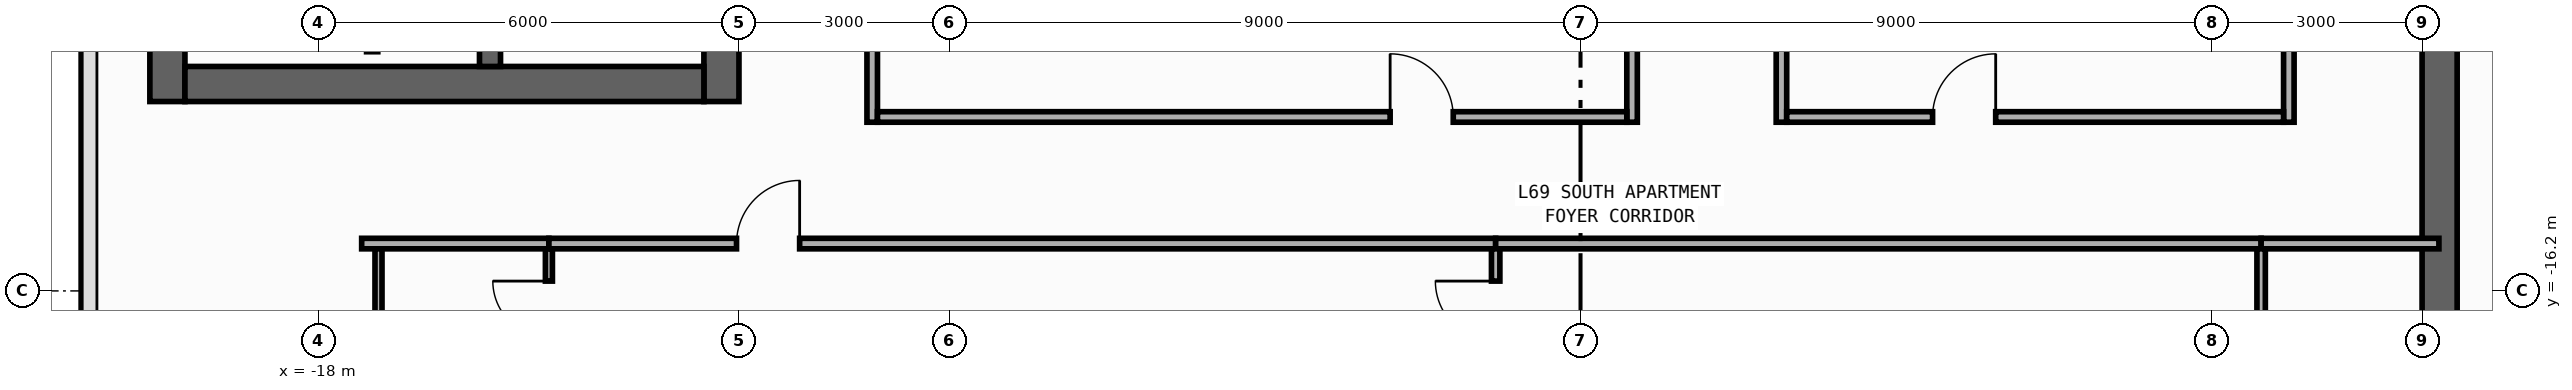
"""IFC4 building model, lengths in metres.
Left out: names, types, materials, properties, quantities, classifications, styles, units other than length and angle.
Written with IfcOpenShell. Run it as: python <this file> out.ifc"""

import sys

from ifc_helpers import new_model, si_unit, direction, frame, frame_2d, origin, place, context, subcontext, project, spatial, rectangle, extrude, element, fill, save


model = new_model("IFC4")
c1 = context("Model", 3, precision=1e-05, world=origin(), true_north=direction((0.0, 1.0)))
c2 = subcontext(c1, "Body", "Model", "MODEL_VIEW")
j1 = project(units=[si_unit("LENGTHUNIT", "METRE"), si_unit("PLANEANGLEUNIT", "RADIAN")], contexts=[c1])
p1 = place(None, origin())
s1 = spatial("IfcSite", under=j1, at=p1, CompositionType="ELEMENT")
p2 = place(p1, origin())
s2 = spatial("IfcBuilding", under=s1, at=p2, CompositionType="ELEMENT")
p3 = place(p2, frame((0.0, 0.0, 289.0)))
s3 = spatial("IfcBuildingStorey", under=s2, at=p3, CompositionType="ELEMENT", Elevation=289.0)
p4 = place(p3, frame((-20.15, -13.5, 0.0), z_axis=(0.0, 0.0, 1.0), x_axis=(0.0, 1.0, 0.0)))
e1 = element("IfcWall", 1, at=p4, inside=s3, PredefinedType="SHEAR", context=c2, shape_type="SweptSolid", body=[
    extrude(rectangle(XDim=27.0, YDim=0.5, at=frame_2d((13.5, 0.0))), origin(), (0.0, 0.0, 1.0), 3.54),
])
p5 = place(p3, frame((-12.25, -13.5, 0.0), z_axis=(0.0, 0.0, 1.0), x_axis=(0.0, 1.0, 0.0)))
e2 = element("IfcWall", 2, at=p5, inside=s3, PredefinedType="SHEAR", context=c2, shape_type="SweptSolid", body=[
    extrude(rectangle(XDim=27.0, YDim=0.5, at=frame_2d((13.5, 0.0))), origin(), (0.0, 0.0, 1.0), 3.54),
])
p6 = place(p5, frame((15.175, 0.0, 0.0)))
e3 = element("IfcOpeningElement", 3, at=p6, cuts=e2, PredefinedType="OPENING", context=c2, shape_type="SweptSolid", body=[
    extrude(rectangle(XDim=0.85, YDim=2.1, at=frame_2d((0.425, 1.05))), frame((0.0, 0.26, 0.0), z_axis=(0.0, -1.0, 0.0), x_axis=(1.0, 0.0, 0.0)), (0.0, 0.0, 1.0), 0.52),
])
p7 = place(p5, frame((21.275, 0.0, 0.0)))
e4 = element("IfcOpeningElement", 4, at=p7, cuts=e2, PredefinedType="OPENING", context=c2, shape_type="SweptSolid", body=[
    extrude(rectangle(XDim=0.85, YDim=2.1, at=frame_2d((0.425, 1.05))), frame((0.0, 0.26, 0.0), z_axis=(0.0, -1.0, 0.0), x_axis=(1.0, 0.0, 0.0)), (0.0, 0.0, 1.0), 0.52),
])
p8 = place(p5, frame((4.275, 0.0, 0.0)))
e5 = element("IfcOpeningElement", 5, at=p8, cuts=e2, PredefinedType="OPENING", context=c2, shape_type="SweptSolid", body=[
    extrude(rectangle(XDim=0.85, YDim=2.1, at=frame_2d((0.425, 1.05))), frame((0.0, 0.26, 0.0), z_axis=(0.0, -1.0, 0.0), x_axis=(1.0, 0.0, 0.0)), (0.0, 0.0, 1.0), 0.52),
])
p9 = place(p5, frame((10.275, 0.0, 0.0)))
e6 = element("IfcOpeningElement", 6, at=p9, cuts=e2, PredefinedType="OPENING", context=c2, shape_type="SweptSolid", body=[
    extrude(rectangle(XDim=0.85, YDim=2.1, at=frame_2d((0.425, 1.05))), frame((0.0, 0.26, 0.0), z_axis=(0.0, -1.0, 0.0), x_axis=(1.0, 0.0, 0.0)), (0.0, 0.0, 1.0), 0.52),
])
p10 = place(p5, frame((12.725, 0.0, 0.0)))
e7 = element("IfcOpeningElement", 7, at=p10, cuts=e2, PredefinedType="OPENING", context=c2, shape_type="SweptSolid", body=[
    extrude(rectangle(XDim=1.15, YDim=2.2, at=frame_2d((0.575, 1.1))), frame((0.0, 0.26, 0.0), z_axis=(0.0, -1.0, 0.0), x_axis=(1.0, 0.0, 0.0)), (0.0, 0.0, 1.0), 0.52),
])
p11 = place(p5, frame((1.625, 0.0, 0.0)))
e8 = element("IfcOpeningElement", 8, at=p11, cuts=e2, PredefinedType="OPENING", context=c2, shape_type="SweptSolid", body=[
    extrude(rectangle(XDim=0.85, YDim=2.1, at=frame_2d((0.425, 1.05))), frame((0.0, 0.26, 0.0), z_axis=(0.0, -1.0, 0.0), x_axis=(1.0, 0.0, 0.0)), (0.0, 0.0, 1.0), 0.52),
])
p12 = place(p3, frame((-19.9, -13.25, 0.0), z_axis=(0.0, 0.0, 1.0), x_axis=(1.0, 0.0, 0.0)))
e9 = element("IfcWall", 9, at=p12, inside=s3, PredefinedType="SHEAR", context=c2, shape_type="SweptSolid", body=[
    extrude(rectangle(XDim=7.4, YDim=0.5, at=frame_2d((3.7, 0.0))), origin(), (0.0, 0.0, 1.0), 3.54),
])
p13 = place(p3, frame((-15.55, -13.0, 0.0), z_axis=(0.0, 0.0, 1.0), x_axis=(0.0, 1.0, 0.0)))
e10 = element("IfcWall", 10, at=p13, inside=s3, PredefinedType="SHEAR", context=c2, shape_type="SweptSolid", body=[
    extrude(rectangle(XDim=26.0, YDim=0.3, at=frame_2d((13.0, 0.0))), origin(), (0.0, 0.0, 1.0), 3.54),
])
p14 = place(p13, frame((12.225, 0.0, 0.0)))
e11 = element("IfcOpeningElement", 11, at=p14, cuts=e10, PredefinedType="OPENING", context=c2, shape_type="SweptSolid", body=[
    extrude(rectangle(XDim=1.15, YDim=2.2, at=frame_2d((0.575, 1.1))), frame((0.0, 0.16, 0.0), z_axis=(0.0, -1.0, 0.0), x_axis=(1.0, 0.0, 0.0)), (0.0, 0.0, 1.0), 0.32),
])
p15 = place(p13, frame((1.125, 0.0, 0.0)))
e12 = element("IfcOpeningElement", 12, at=p15, cuts=e10, PredefinedType="OPENING", context=c2, shape_type="SweptSolid", body=[
    extrude(rectangle(XDim=0.85, YDim=2.1, at=frame_2d((0.425, 1.05))), frame((0.0, 0.16, 0.0), z_axis=(0.0, -1.0, 0.0), x_axis=(1.0, 0.0, 0.0)), (0.0, 0.0, 1.0), 0.32),
])
p16 = place(p3, frame((12.25, -19.8, 0.0), z_axis=(0.0, 0.0, 1.0), x_axis=(0.0, 1.0, 0.0)))
e13 = element("IfcWall", 13, at=p16, inside=s3, PredefinedType="SHEAR", context=c2, shape_type="SweptSolid", body=[
    extrude(rectangle(XDim=27.0, YDim=0.5, at=frame_2d((13.5, 0.0))), origin(), (0.0, 0.0, 1.0), 3.54),
])
p17 = place(p16, frame((23.05, 0.0, 0.0)))
e14 = element("IfcOpeningElement", 14, at=p17, cuts=e13, PredefinedType="OPENING", context=c2, shape_type="SweptSolid", body=[
    extrude(rectangle(XDim=1.1, YDim=2.2, at=frame_2d((0.55, 1.1))), frame((0.0, 0.26, 0.0), z_axis=(0.0, -1.0, 0.0), x_axis=(1.0, 0.0, 0.0)), (0.0, 0.0, 1.0), 0.52),
])
p18 = place(p16, frame((19.85, 0.0, 0.0)))
e15 = element("IfcOpeningElement", 15, at=p18, cuts=e13, PredefinedType="OPENING", context=c2, shape_type="SweptSolid", body=[
    extrude(rectangle(XDim=1.1, YDim=2.2, at=frame_2d((0.55, 1.1))), frame((0.0, 0.26, 0.0), z_axis=(0.0, -1.0, 0.0), x_axis=(1.0, 0.0, 0.0)), (0.0, 0.0, 1.0), 0.52),
])
p19 = place(p16, frame((16.65, 0.0, 0.0)))
e16 = element("IfcOpeningElement", 16, at=p19, cuts=e13, PredefinedType="OPENING", context=c2, shape_type="SweptSolid", body=[
    extrude(rectangle(XDim=1.1, YDim=2.2, at=frame_2d((0.55, 1.1))), frame((0.0, 0.26, 0.0), z_axis=(0.0, -1.0, 0.0), x_axis=(1.0, 0.0, 0.0)), (0.0, 0.0, 1.0), 0.52),
])
p20 = place(p16, frame((10.175, 0.0, 0.0)))
e17 = element("IfcOpeningElement", 17, at=p20, cuts=e13, PredefinedType="OPENING", context=c2, shape_type="SweptSolid", body=[
    extrude(rectangle(XDim=0.85, YDim=2.1, at=frame_2d((0.425, 1.05))), frame((0.0, 0.26, 0.0), z_axis=(0.0, -1.0, 0.0), x_axis=(1.0, 0.0, 0.0)), (0.0, 0.0, 1.0), 0.52),
])
p21 = place(p16, frame((12.725, 0.0, 0.0)))
e18 = element("IfcOpeningElement", 18, at=p21, cuts=e13, PredefinedType="OPENING", context=c2, shape_type="SweptSolid", body=[
    extrude(rectangle(XDim=1.15, YDim=2.2, at=frame_2d((0.575, 1.1))), frame((0.0, 0.26, 0.0), z_axis=(0.0, -1.0, 0.0), x_axis=(1.0, 0.0, 0.0)), (0.0, 0.0, 1.0), 0.52),
])
p22 = place(p16, frame((25.125, 0.0, 0.0)))
e19 = element("IfcOpeningElement", 19, at=p22, cuts=e13, PredefinedType="OPENING", context=c2, shape_type="SweptSolid", body=[
    extrude(rectangle(XDim=0.85, YDim=2.1, at=frame_2d((0.425, 1.05))), frame((0.0, 0.26, 0.0), z_axis=(0.0, -1.0, 0.0), x_axis=(1.0, 0.0, 0.0)), (0.0, 0.0, 1.0), 0.52),
])
p23 = place(p3, frame((-10.1, -13.795, 0.0), z_axis=(0.0, 0.0, 1.0), x_axis=(0.0, 1.0, 0.0)))
e20 = element("IfcWall", 20, at=p23, inside=s3, PredefinedType="PARTITIONING", context=c2, shape_type="SweptSolid", body=[
    extrude(rectangle(XDim=14.205, YDim=0.15, at=frame_2d((7.103, 0.0))), origin(), (0.0, 0.0, 1.0), 3.54),
])
p24 = place(p23, frame((7.972, 0.0, 0.0)))
e21 = element("IfcOpeningElement", 21, at=p24, cuts=e20, PredefinedType="OPENING", context=c2, shape_type="SweptSolid", body=[
    extrude(rectangle(XDim=0.9, YDim=2.15, at=frame_2d((0.45, 1.075))), frame((0.0, 0.085, 0.0), z_axis=(0.0, -1.0, 0.0), x_axis=(1.0, 0.0, 0.0)), (0.0, 0.0, 1.0), 0.17),
])
p25 = place(p3, frame((10.1, -13.795, 0.0), z_axis=(0.0, 0.0, 1.0), x_axis=(0.0, 1.0, 0.0)))
e22 = element("IfcWall", 22, at=p25, inside=s3, PredefinedType="PARTITIONING", context=c2, shape_type="SweptSolid", body=[
    extrude(rectangle(XDim=11.575, YDim=0.15, at=frame_2d((5.788, 0.0))), origin(), (0.0, 0.0, 1.0), 3.54),
])
p26 = place(p25, frame((7.979, 0.0, 0.0)))
e23 = element("IfcOpeningElement", 23, at=p26, cuts=e22, PredefinedType="OPENING", context=c2, shape_type="SweptSolid", body=[
    extrude(rectangle(XDim=0.9, YDim=2.15, at=frame_2d((0.45, 1.075))), frame((0.0, 0.085, 0.0), z_axis=(0.0, -1.0, 0.0), x_axis=(1.0, 0.0, 0.0)), (0.0, 0.0, 1.0), 0.17),
])
p27 = place(p3, frame((0.735, -13.795, 0.0), z_axis=(0.0, 0.0, 1.0), x_axis=(0.0, 1.0, 0.0)))
e24 = element("IfcWall", 24, at=p27, inside=s3, PredefinedType="PARTITIONING", context=c2, shape_type="SweptSolid", body=[
    extrude(rectangle(XDim=14.055, YDim=0.15, at=frame_2d((7.027, 0.0))), origin(), (0.0, 0.0, 1.0), 3.54),
])
p28 = place(p27, frame((7.881, 0.0, 0.0)))
e25 = element("IfcOpeningElement", 25, at=p28, cuts=e24, PredefinedType="OPENING", context=c2, shape_type="SweptSolid", body=[
    extrude(rectangle(XDim=0.9, YDim=2.15, at=frame_2d((0.45, 1.075))), frame((0.0, 0.085, 0.0), z_axis=(0.0, -1.0, 0.0), x_axis=(1.0, 0.0, 0.0)), (0.0, 0.0, 1.0), 0.17),
])
p29 = place(p3, frame((2.865, -13.795, 0.0), z_axis=(0.0, 0.0, 1.0), x_axis=(0.0, 1.0, 0.0)))
e26 = element("IfcWall", 26, at=p29, inside=s3, PredefinedType="PARTITIONING", context=c2, shape_type="SweptSolid", body=[
    extrude(rectangle(XDim=11.415, YDim=0.15, at=frame_2d((5.708, 0.0))), origin(), (0.0, 0.0, 1.0), 3.54),
])
p30 = place(p29, frame((8.013, 0.0, 0.0)))
e27 = element("IfcOpeningElement", 27, at=p30, cuts=e26, PredefinedType="OPENING", context=c2, shape_type="SweptSolid", body=[
    extrude(rectangle(XDim=0.9, YDim=2.15, at=frame_2d((0.45, 1.075))), frame((0.0, 0.085, 0.0), z_axis=(0.0, -1.0, 0.0), x_axis=(1.0, 0.0, 0.0)), (0.0, 0.0, 1.0), 0.17),
])
p31 = place(p3, frame((-17.38, -15.525, 0.0), z_axis=(0.0, 0.0, 1.0), x_axis=(1.0, 0.0, 0.0)))
e28 = element("IfcWall", 28, at=p31, inside=s3, PredefinedType="PARTITIONING", context=c2, shape_type="SweptSolid", body=[
    extrude(rectangle(XDim=2.67, YDim=0.15, at=frame_2d((1.335, 0.0))), origin(), (0.0, 0.0, 1.0), 3.54),
])
p32 = place(p3, frame((-14.71, -15.525, 0.0), z_axis=(0.0, 0.0, 1.0), x_axis=(1.0, 0.0, 0.0)))
e29 = element("IfcWall", 29, at=p32, inside=s3, PredefinedType="PARTITIONING", context=c2, shape_type="SweptSolid", body=[
    extrude(rectangle(XDim=13.5, YDim=0.15, at=frame_2d((6.75, 0.0))), origin(), (0.0, 0.0, 1.0), 3.54),
])
p33 = place(p32, frame((2.675, 0.0, 0.0)))
e30 = element("IfcOpeningElement", 30, at=p33, cuts=e29, PredefinedType="OPENING", context=c2, shape_type="SweptSolid", body=[
    extrude(rectangle(XDim=0.9, YDim=2.15, at=frame_2d((0.45, 1.075))), frame((0.0, 0.085, 0.0), z_axis=(0.0, -1.0, 0.0), x_axis=(1.0, 0.0, 0.0)), (0.0, 0.0, 1.0), 0.17),
])
p34 = place(p3, frame((-1.21, -15.525, 0.0), z_axis=(0.0, 0.0, 1.0), x_axis=(1.0, 0.0, 0.0)))
e31 = element("IfcWall", 31, at=p34, inside=s3, PredefinedType="PARTITIONING", context=c2, shape_type="SweptSolid", body=[
    extrude(rectangle(XDim=10.915, YDim=0.15, at=frame_2d((5.458, 0.0))), origin(), (0.0, 0.0, 1.0), 3.54),
])
p35 = place(p3, frame((9.705, -15.525, 0.0), z_axis=(0.0, 0.0, 1.0), x_axis=(1.0, 0.0, 0.0)))
e32 = element("IfcWall", 32, at=p35, inside=s3, PredefinedType="PARTITIONING", context=c2, shape_type="SweptSolid", body=[
    extrude(rectangle(XDim=2.535, YDim=0.15, at=frame_2d((1.268, 0.0))), origin(), (0.0, 0.0, 1.0), 3.54),
])
p36 = place(p3, frame((-10.025, -13.72, 0.0), z_axis=(0.0, 0.0, 1.0), x_axis=(1.0, 0.0, 0.0)))
e33 = element("IfcWall", 33, at=p36, inside=s3, PredefinedType="PARTITIONING", context=c2, shape_type="SweptSolid", body=[
    extrude(rectangle(XDim=10.685, YDim=0.15, at=frame_2d((5.342, 0.0))), origin(), (0.0, 0.0, 1.0), 3.54),
])
p37 = place(p36, frame((7.31, 0.0, 0.0)))
e34 = element("IfcOpeningElement", 34, at=p37, cuts=e33, PredefinedType="OPENING", context=c2, shape_type="SweptSolid", body=[
    extrude(rectangle(XDim=0.9, YDim=2.15, at=frame_2d((0.45, 1.075))), frame((0.0, 0.085, 0.0), z_axis=(0.0, -1.0, 0.0), x_axis=(1.0, 0.0, 0.0)), (0.0, 0.0, 1.0), 0.17),
])
p38 = place(p3, frame((2.94, -13.72, 0.0), z_axis=(0.0, 0.0, 1.0), x_axis=(1.0, 0.0, 0.0)))
e35 = element("IfcWall", 35, at=p38, inside=s3, PredefinedType="PARTITIONING", context=c2, shape_type="SweptSolid", body=[
    extrude(rectangle(XDim=7.085, YDim=0.15, at=frame_2d((3.542, 0.0))), origin(), (0.0, 0.0, 1.0), 3.54),
])
p39 = place(p38, frame((2.08, 0.0, 0.0)))
e36 = element("IfcOpeningElement", 36, at=p39, cuts=e35, PredefinedType="OPENING", context=c2, shape_type="SweptSolid", body=[
    extrude(rectangle(XDim=0.9, YDim=2.15, at=frame_2d((0.45, 1.075))), frame((0.0, 0.085, 0.0), z_axis=(0.0, -1.0, 0.0), x_axis=(1.0, 0.0, 0.0)), (0.0, 0.0, 1.0), 0.17),
])
p40 = place(p3, frame((-14.71, -18.1, 0.0), z_axis=(0.0, 0.0, 1.0), x_axis=(0.0, 1.0, 0.0)))
e37 = element("IfcWall", 37, at=p40, inside=s3, PredefinedType="PARTITIONING", context=c2, shape_type="SweptSolid", body=[
    extrude(rectangle(XDim=2.5, YDim=0.1, at=frame_2d((1.25, 0.0))), origin(), (0.0, 0.0, 1.0), 2.64),
])
p41 = place(p40, frame((1.24, 0.0, 0.0)))
e38 = element("IfcOpeningElement", 38, at=p41, cuts=e37, PredefinedType="OPENING", context=c2, shape_type="SweptSolid", body=[
    extrude(rectangle(XDim=0.8, YDim=2.1, at=frame_2d((0.4, 1.05))), frame((0.0, 0.06, 0.0), z_axis=(0.0, -1.0, 0.0), x_axis=(1.0, 0.0, 0.0)), (0.0, 0.0, 1.0), 0.12),
])
p42 = place(p3, frame((-1.21, -20.1, 0.0), z_axis=(0.0, 0.0, 1.0), x_axis=(0.0, 1.0, 0.0)))
e39 = element("IfcWall", 39, at=p42, inside=s3, PredefinedType="PARTITIONING", context=c2, shape_type="SweptSolid", body=[
    extrude(rectangle(XDim=4.5, YDim=0.12, at=frame_2d((2.25, 0.0))), origin(), (0.0, 0.0, 1.0), 3.54),
])
p43 = place(p42, frame((3.18, 0.0, 0.0)))
e40 = element("IfcOpeningElement", 40, at=p43, cuts=e39, PredefinedType="OPENING", context=c2, shape_type="SweptSolid", body=[
    extrude(rectangle(XDim=0.86, YDim=2.15, at=frame_2d((0.43, 1.075))), frame((0.0, 0.07, 0.0), z_axis=(0.0, -1.0, 0.0), x_axis=(1.0, 0.0, 0.0)), (0.0, 0.0, 1.0), 0.14),
])
p44 = place(p3, frame((9.705, -23.932, 0.0), z_axis=(0.0, 0.0, 1.0), x_axis=(0.0, 1.0, 0.0)))
e41 = element("IfcWall", 41, at=p44, inside=s3, PredefinedType="PARTITIONING", context=c2, shape_type="SweptSolid", body=[
    extrude(rectangle(XDim=8.332, YDim=0.12, at=frame_2d((4.166, 0.0))), origin(), (0.0, 0.0, 1.0), 3.54),
])
p45 = place(p44, frame((0.46, 0.0, 0.0)))
e42 = element("IfcOpeningElement", 42, at=p45, cuts=e41, PredefinedType="OPENING", context=c2, shape_type="SweptSolid", body=[
    extrude(rectangle(XDim=0.8, YDim=2.1, at=frame_2d((0.4, 1.05))), frame((0.0, 0.07, 0.0), z_axis=(0.0, -1.0, 0.0), x_axis=(1.0, 0.0, 0.0)), (0.0, 0.0, 1.0), 0.14),
])
p46 = place(p3, frame((-17.14, -18.05, 0.0), z_axis=(0.0, 0.0, 1.0), x_axis=(0.0, 1.0, 0.0)))
e43 = element("IfcWall", 43, at=p46, inside=s3, PredefinedType="PARTITIONING", context=c2, shape_type="SweptSolid", body=[
    extrude(rectangle(XDim=2.45, YDim=0.1, at=frame_2d((1.225, 0.0))), origin(), (0.0, 0.0, 1.0), 3.54),
])
p47 = place(p33, origin())
e44 = element("IfcDoor", 44, at=p47, inside=s3, OperationType="SINGLE_SWING_RIGHT", PredefinedType="DOOR", context=c2, shape_type="SweptSolid", body=[
    extrude(rectangle(XDim=0.9, YDim=2.15, at=frame_2d((0.45, 1.075))), frame((0.0, 0.025, 0.0), z_axis=(0.0, -1.0, 0.0), x_axis=(1.0, 0.0, 0.0)), (0.0, 0.0, 1.0), 0.05),
])
fill(e30, e44)
p48 = place(p37, origin())
e45 = element("IfcDoor", 45, at=p48, inside=s3, OperationType="SINGLE_SWING_LEFT", PredefinedType="DOOR", context=c2, shape_type="SweptSolid", body=[
    extrude(rectangle(XDim=0.9, YDim=2.15, at=frame_2d((0.45, 1.075))), frame((0.0, 0.025, 0.0), z_axis=(0.0, -1.0, 0.0), x_axis=(1.0, 0.0, 0.0)), (0.0, 0.0, 1.0), 0.05),
])
fill(e34, e45)
p49 = place(p39, origin())
e46 = element("IfcDoor", 46, at=p49, inside=s3, OperationType="SINGLE_SWING_RIGHT", PredefinedType="DOOR", context=c2, shape_type="SweptSolid", body=[
    extrude(rectangle(XDim=0.9, YDim=2.15, at=frame_2d((0.45, 1.075))), frame((0.0, 0.025, 0.0), z_axis=(0.0, -1.0, 0.0), x_axis=(1.0, 0.0, 0.0)), (0.0, 0.0, 1.0), 0.05),
])
fill(e36, e46)
p50 = place(p41, origin())
e47 = element("IfcDoor", 47, at=p50, inside=s3, OperationType="SINGLE_SWING_RIGHT", PredefinedType="DOOR", context=c2, shape_type="SweptSolid", body=[
    extrude(rectangle(XDim=0.8, YDim=2.1, at=frame_2d((0.4, 1.05))), frame((0.0, 0.025, 0.0), z_axis=(0.0, -1.0, 0.0), x_axis=(1.0, 0.0, 0.0)), (0.0, 0.0, 1.0), 0.05),
])
fill(e38, e47)
p51 = place(p43, origin())
e48 = element("IfcDoor", 48, at=p51, inside=s3, OperationType="SINGLE_SWING_RIGHT", PredefinedType="DOOR", context=c2, shape_type="SweptSolid", body=[
    extrude(rectangle(XDim=0.86, YDim=2.15, at=frame_2d((0.43, 1.075))), frame((0.0, 0.025, 0.0), z_axis=(0.0, -1.0, 0.0), x_axis=(1.0, 0.0, 0.0)), (0.0, 0.0, 1.0), 0.05),
])
fill(e40, e48)
save(model, sys.argv[1])
